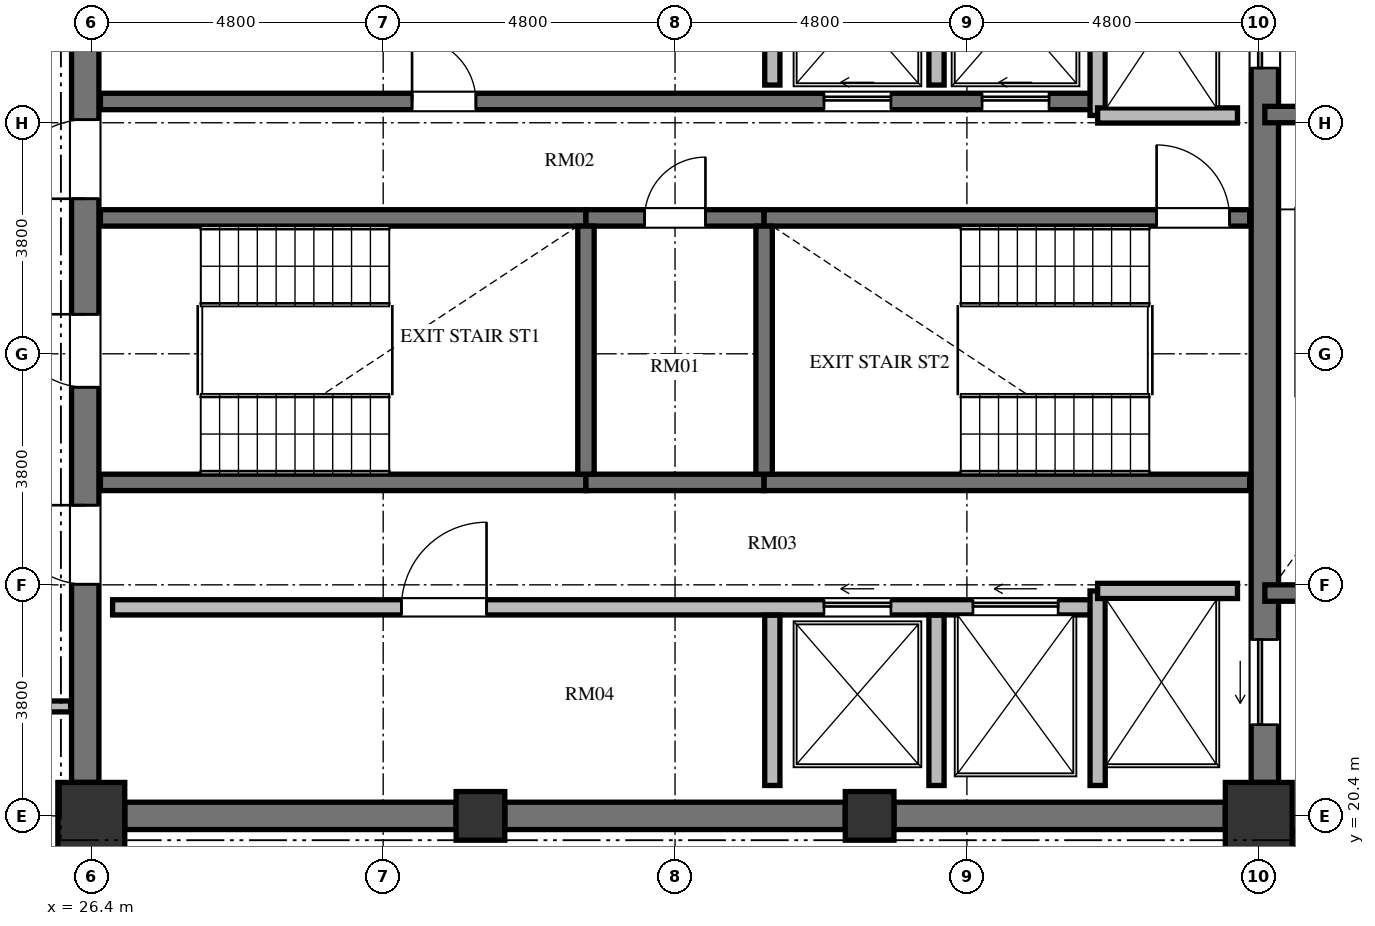
"""IFC4 building model, lengths in metres.
Left out: names, types, materials, properties, quantities, classifications, styles, units other than length and angle.
Written with IfcOpenShell. Run it as: python <this file> out.ifc"""

import sys

from ifc_helpers import new_model, si_unit, direction, frame, frame_2d, origin, origin_2d, place, context, subcontext, project, spatial, rectangle, extrude, element, fill, save


model = new_model("IFC4")
c1 = context("Model", 3, precision=1e-05, world=origin(), true_north=direction((0.0, 1.0)))
c2 = subcontext(c1, "Body", "Model", "MODEL_VIEW")
j1 = project(units=[si_unit("LENGTHUNIT", "METRE"), si_unit("PLANEANGLEUNIT", "RADIAN")], contexts=[c1])
p1 = place(None, origin())
s1 = spatial("IfcSite", under=j1, at=p1, CompositionType="ELEMENT")
p2 = place(p1, origin())
s2 = spatial("IfcBuilding", under=s1, at=p2, CompositionType="ELEMENT")
p3 = place(p2, frame((0.0, 0.0, 269.616)))
s3 = spatial("IfcBuildingStorey", under=s2, at=p3, CompositionType="ELEMENT", Elevation=269.616)
p4 = place(p3, frame((26.4, 20.4, 0.0), z_axis=(0.0, 0.0, 1.0), x_axis=(1.0, 0.0, 0.0)))
e1 = element("IfcColumn", 1, at=p4, inside=s3, PredefinedType="COLUMN", context=c2, shape_type="SweptSolid", body=[
    extrude(rectangle(XDim=1.1, YDim=1.1, at=origin_2d()), origin(), (0.0, 0.0, 1.0), 3.648),
])
for number, where, z_axis, x_axis in (
    (2, (32.8, 20.4, 0.0), (0.0, 0.0, 1.0), (1.0, 0.0, 0.0)),
    (3, (39.2, 20.4, 0.0), (0.0, 0.0, 1.0), (1.0, 0.0, 0.0)),
):
    element("IfcColumn", number, at=place(p3, frame(where, z_axis=z_axis, x_axis=x_axis)), inside=s3, PredefinedType="COLUMN", context=c2, shape_type="SweptSolid", body=[
        extrude(rectangle(XDim=0.8, YDim=0.8, at=origin_2d()), origin(), (0.0, 0.0, 1.0), 3.648),
    ])
p5 = place(p3, frame((45.6, 20.4, 0.0), z_axis=(0.0, 0.0, 1.0), x_axis=(1.0, 0.0, 0.0)))
e4 = element("IfcColumn", 4, at=p5, inside=s3, PredefinedType="COLUMN", context=c2, shape_type="SweptSolid", body=[
    extrude(rectangle(XDim=1.1, YDim=1.1, at=origin_2d()), origin(), (0.0, 0.0, 1.0), 3.648),
])
p6 = place(p3, frame((26.3, 20.95, 0.0), z_axis=(0.0, 0.0, 1.0), x_axis=(0.0, 1.0, 0.0)))
e5 = element("IfcWall", 5, at=p6, inside=s3, PredefinedType="SHEAR", context=c2, shape_type="SweptSolid", body=[
    extrude(rectangle(XDim=14.1, YDim=0.45, at=frame_2d((7.05, 0.0))), origin(), (0.0, 0.0, 1.0), 3.648),
])
p7 = place(p6, frame((6.5, 0.0, 0.0)))
e6 = element("IfcOpeningElement", 6, at=p7, cuts=e5, PredefinedType="OPENING", context=c2, shape_type="SweptSolid", body=[
    extrude(rectangle(XDim=1.2, YDim=2.15, at=frame_2d((0.6, 1.075))), frame((0.0, 0.235, 0.0), z_axis=(0.0, -1.0, 0.0), x_axis=(1.0, 0.0, 0.0)), (0.0, 0.0, 1.0), 0.47),
])
p8 = place(p6, frame((9.6, 0.0, 0.0)))
e7 = element("IfcOpeningElement", 7, at=p8, cuts=e5, PredefinedType="OPENING", context=c2, shape_type="SweptSolid", body=[
    extrude(rectangle(XDim=1.3, YDim=2.2, at=frame_2d((0.65, 1.1))), frame((0.0, 0.235, 0.0), z_axis=(0.0, -1.0, 0.0), x_axis=(1.0, 0.0, 0.0)), (0.0, 0.0, 1.0), 0.47),
])
p9 = place(p6, frame((3.26, 0.0, 0.0)))
e8 = element("IfcOpeningElement", 8, at=p9, cuts=e5, PredefinedType="OPENING", context=c2, shape_type="SweptSolid", body=[
    extrude(rectangle(XDim=1.3, YDim=2.2, at=frame_2d((0.65, 1.1))), frame((0.0, 0.235, 0.0), z_axis=(0.0, -1.0, 0.0), x_axis=(1.0, 0.0, 0.0)), (0.0, 0.0, 1.0), 0.47),
])
p10 = place(p3, frame((45.7, 20.95, 0.0), z_axis=(0.0, 0.0, 1.0), x_axis=(0.0, 1.0, 0.0)))
e9 = element("IfcWall", 9, at=p10, inside=s3, PredefinedType="SHEAR", context=c2, shape_type="SweptSolid", body=[
    extrude(rectangle(XDim=14.1, YDim=0.45, at=frame_2d((7.05, 0.0))), origin(), (0.0, 0.0, 1.0), 3.648),
])
p11 = place(p10, frame((11.75, 0.0, 0.0)))
e10 = element("IfcOpeningElement", 10, at=p11, cuts=e9, PredefinedType="OPENING", context=c2, shape_type="SweptSolid", body=[
    extrude(rectangle(XDim=1.4, YDim=2.3, at=frame_2d((0.7, 1.15))), frame((0.0, 0.235, 0.0), z_axis=(0.0, -1.0, 0.0), x_axis=(1.0, 0.0, 0.0)), (0.0, 0.0, 1.0), 0.47),
])
p12 = place(p10, frame((0.95, 0.0, 0.0)))
e11 = element("IfcOpeningElement", 11, at=p12, cuts=e9, PredefinedType="OPENING", context=c2, shape_type="SweptSolid", body=[
    extrude(rectangle(XDim=1.4, YDim=2.3, at=frame_2d((0.7, 1.15))), frame((0.0, 0.235, 0.0), z_axis=(0.0, -1.0, 0.0), x_axis=(1.0, 0.0, 0.0)), (0.0, 0.0, 1.0), 0.47),
])
p13 = place(p3, frame((26.95, 20.4, 0.0), z_axis=(0.0, 0.0, 1.0), x_axis=(1.0, 0.0, 0.0)))
e12 = element("IfcWall", 12, at=p13, inside=s3, PredefinedType="SHEAR", context=c2, shape_type="SweptSolid", body=[
    extrude(rectangle(XDim=5.45, YDim=0.45, at=frame_2d((2.725, 0.0))), origin(), (0.0, 0.0, 1.0), 3.648),
])
p14 = place(p3, frame((33.2, 20.4, 0.0), z_axis=(0.0, 0.0, 1.0), x_axis=(1.0, 0.0, 0.0)))
e13 = element("IfcWall", 13, at=p14, inside=s3, PredefinedType="SHEAR", context=c2, shape_type="SweptSolid", body=[
    extrude(rectangle(XDim=5.6, YDim=0.45, at=frame_2d((2.8, 0.0))), origin(), (0.0, 0.0, 1.0), 3.648),
])
p15 = place(p3, frame((39.6, 20.4, 0.0), z_axis=(0.0, 0.0, 1.0), x_axis=(1.0, 0.0, 0.0)))
e14 = element("IfcWall", 14, at=p15, inside=s3, PredefinedType="SHEAR", context=c2, shape_type="SweptSolid", body=[
    extrude(rectangle(XDim=5.45, YDim=0.45, at=frame_2d((2.725, 0.0))), origin(), (0.0, 0.0, 1.0), 3.648),
])
p16 = place(p3, frame((26.55, 30.235, 0.0), z_axis=(0.0, 0.0, 1.0), x_axis=(1.0, 0.0, 0.0)))
e15 = element("IfcWall", 15, at=p16, inside=s3, PredefinedType="SHEAR", context=c2, shape_type="SweptSolid", body=[
    extrude(rectangle(XDim=7.985, YDim=0.27, at=frame_2d((3.992, 0.0))), origin(), (0.0, 0.0, 1.0), 3.648),
])
p17 = place(p3, frame((34.535, 30.235, 0.0), z_axis=(0.0, 0.0, 1.0), x_axis=(1.0, 0.0, 0.0)))
e16 = element("IfcWall", 16, at=p17, inside=s3, PredefinedType="SHEAR", context=c2, shape_type="SweptSolid", body=[
    extrude(rectangle(XDim=2.93, YDim=0.27, at=frame_2d((1.465, 0.0))), origin(), (0.0, 0.0, 1.0), 3.648),
])
p18 = place(p17, frame((0.965, 0.0, 0.0)))
e17 = element("IfcOpeningElement", 17, at=p18, cuts=e16, PredefinedType="OPENING", context=c2, shape_type="SweptSolid", body=[
    extrude(rectangle(XDim=1.0, YDim=2.1, at=frame_2d((0.5, 1.05))), frame((0.0, 0.145, 0.0), z_axis=(0.0, -1.0, 0.0), x_axis=(1.0, 0.0, 0.0)), (0.0, 0.0, 1.0), 0.29),
])
p19 = place(p3, frame((37.465, 30.235, 0.0), z_axis=(0.0, 0.0, 1.0), x_axis=(1.0, 0.0, 0.0)))
e18 = element("IfcWall", 18, at=p19, inside=s3, PredefinedType="SHEAR", context=c2, shape_type="SweptSolid", body=[
    extrude(rectangle(XDim=7.985, YDim=0.27, at=frame_2d((3.992, 0.0))), origin(), (0.0, 0.0, 1.0), 3.648),
])
p20 = place(p19, frame((6.455, 0.0, 0.0)))
e19 = element("IfcOpeningElement", 19, at=p20, cuts=e18, PredefinedType="OPENING", context=c2, shape_type="SweptSolid", body=[
    extrude(rectangle(XDim=1.2, YDim=2.15, at=frame_2d((0.6, 1.075))), frame((0.0, 0.145, 0.0), z_axis=(0.0, -1.0, 0.0), x_axis=(1.0, 0.0, 0.0)), (0.0, 0.0, 1.0), 0.29),
])
p21 = place(p3, frame((26.55, 25.885, 0.0), z_axis=(0.0, 0.0, 1.0), x_axis=(1.0, 0.0, 0.0)))
e20 = element("IfcWall", 20, at=p21, inside=s3, PredefinedType="SHEAR", context=c2, shape_type="SweptSolid", body=[
    extrude(rectangle(XDim=7.985, YDim=0.27, at=frame_2d((3.992, 0.0))), origin(), (0.0, 0.0, 1.0), 3.648),
])
p22 = place(p3, frame((34.535, 25.885, 0.0), z_axis=(0.0, 0.0, 1.0), x_axis=(1.0, 0.0, 0.0)))
e21 = element("IfcWall", 21, at=p22, inside=s3, PredefinedType="SHEAR", context=c2, shape_type="SweptSolid", body=[
    extrude(rectangle(XDim=2.93, YDim=0.27, at=frame_2d((1.465, 0.0))), origin(), (0.0, 0.0, 1.0), 3.648),
])
p23 = place(p3, frame((37.465, 25.885, 0.0), z_axis=(0.0, 0.0, 1.0), x_axis=(1.0, 0.0, 0.0)))
e22 = element("IfcWall", 22, at=p23, inside=s3, PredefinedType="SHEAR", context=c2, shape_type="SweptSolid", body=[
    extrude(rectangle(XDim=7.985, YDim=0.27, at=frame_2d((3.992, 0.0))), origin(), (0.0, 0.0, 1.0), 3.648),
])
for number, where, z_axis, x_axis in (
    (23, (34.535, 26.02, 0.0), (0.0, 0.0, 1.0), (0.0, 1.0, 0.0)),
    (24, (37.465, 26.02, 0.0), (0.0, 0.0, 1.0), (0.0, 1.0, 0.0)),
):
    element("IfcWall", number, at=place(p3, frame(where, z_axis=z_axis, x_axis=x_axis)), inside=s3, PredefinedType="SHEAR", context=c2, shape_type="SweptSolid", body=[
        extrude(rectangle(XDim=4.08, YDim=0.27, at=frame_2d((2.04, 0.0))), origin(), (0.0, 0.0, 1.0), 3.648),
    ])
p24 = place(p3, frame((26.55, 32.15, 0.0), z_axis=(0.0, 0.0, 1.0), x_axis=(1.0, 0.0, 0.0)))
e25 = element("IfcWall", 25, at=p24, inside=s3, PredefinedType="SHEAR", context=c2, shape_type="SweptSolid", body=[
    extrude(rectangle(XDim=16.4, YDim=0.27, at=frame_2d((8.2, 0.0))), origin(), (0.0, 0.0, 1.0), 3.648),
])
p25 = place(p24, frame((5.125, 0.0, 0.0)))
e26 = element("IfcOpeningElement", 26, at=p25, cuts=e25, PredefinedType="OPENING", context=c2, shape_type="SweptSolid", body=[
    extrude(rectangle(XDim=1.05, YDim=2.15, at=frame_2d((0.525, 1.075))), frame((0.0, 0.145, 0.0), z_axis=(0.0, -1.0, 0.0), x_axis=(1.0, 0.0, 0.0)), (0.0, 0.0, 1.0), 0.29),
])
p26 = place(p24, frame((11.9, 0.0, 0.0)))
e27 = element("IfcOpeningElement", 27, at=p26, cuts=e25, PredefinedType="OPENING", context=c2, shape_type="SweptSolid", body=[
    extrude(rectangle(XDim=1.1, YDim=2.2, at=frame_2d((0.55, 1.1))), frame((0.0, 0.145, 0.0), z_axis=(0.0, -1.0, 0.0), x_axis=(1.0, 0.0, 0.0)), (0.0, 0.0, 1.0), 0.29),
])
p27 = place(p24, frame((14.5, 0.0, 0.0)))
e28 = element("IfcOpeningElement", 28, at=p27, cuts=e25, PredefinedType="OPENING", context=c2, shape_type="SweptSolid", body=[
    extrude(rectangle(XDim=1.1, YDim=2.2, at=frame_2d((0.55, 1.1))), frame((0.0, 0.145, 0.0), z_axis=(0.0, -1.0, 0.0), x_axis=(1.0, 0.0, 0.0)), (0.0, 0.0, 1.0), 0.29),
])
p28 = place(p3, frame((26.75, 23.83, 0.0), z_axis=(0.0, 0.0, 1.0), x_axis=(1.0, 0.0, 0.0)))
e29 = element("IfcWall", 29, at=p28, inside=s3, PredefinedType="SOLIDWALL", context=c2, shape_type="SweptSolid", body=[
    extrude(rectangle(XDim=16.2, YDim=0.25, at=frame_2d((8.1, 0.0))), origin(), (0.0, 0.0, 1.0), 3.448),
])
p29 = place(p28, frame((4.75, 0.0, 0.0)))
e30 = element("IfcOpeningElement", 30, at=p29, cuts=e29, PredefinedType="OPENING", context=c2, shape_type="SweptSolid", body=[
    extrude(rectangle(XDim=1.4, YDim=2.2, at=frame_2d((0.7, 1.1))), frame((0.0, 0.135, 0.0), z_axis=(0.0, -1.0, 0.0), x_axis=(1.0, 0.0, 0.0)), (0.0, 0.0, 1.0), 0.27),
])
p30 = place(p28, frame((11.7, 0.0, 0.0)))
e31 = element("IfcOpeningElement", 31, at=p30, cuts=e29, PredefinedType="OPENING", context=c2, shape_type="SweptSolid", body=[
    extrude(rectangle(XDim=1.1, YDim=2.2, at=frame_2d((0.55, 1.1))), frame((0.0, 0.135, 0.0), z_axis=(0.0, -1.0, 0.0), x_axis=(1.0, 0.0, 0.0)), (0.0, 0.0, 1.0), 0.27),
])
p31 = place(p28, frame((14.15, 0.0, 0.0)))
e32 = element("IfcOpeningElement", 32, at=p31, cuts=e29, PredefinedType="OPENING", context=c2, shape_type="SweptSolid", body=[
    extrude(rectangle(XDim=1.4, YDim=2.3, at=frame_2d((0.7, 1.15))), frame((0.0, 0.135, 0.0), z_axis=(0.0, -1.0, 0.0), x_axis=(1.0, 0.0, 0.0)), (0.0, 0.0, 1.0), 0.27),
])
p32 = place(p3, frame((42.95, 31.92, 0.0), z_axis=(0.0, 0.0, 1.0), x_axis=(0.0, 1.0, 0.0)))
e33 = element("IfcWall", 33, at=p32, inside=s3, PredefinedType="SOLIDWALL", context=c2, shape_type="SweptSolid", body=[
    extrude(rectangle(XDim=3.18, YDim=0.25, at=frame_2d((1.59, 0.0))), origin(), (0.0, 0.0, 1.0), 3.448),
])
p33 = place(p3, frame((42.95, 31.92, 0.0), z_axis=(0.0, 0.0, 1.0), x_axis=(1.0, 0.0, 0.0)))
e34 = element("IfcWall", 34, at=p33, inside=s3, PredefinedType="SOLIDWALL", context=c2, shape_type="SweptSolid", body=[
    extrude(rectangle(XDim=2.3, YDim=0.25, at=frame_2d((1.15, 0.0))), origin(), (0.0, 0.0, 1.0), 3.448),
])
p34 = place(p3, frame((42.95, 20.9, 0.0), z_axis=(0.0, 0.0, 1.0), x_axis=(0.0, 1.0, 0.0)))
e35 = element("IfcWall", 35, at=p34, inside=s3, PredefinedType="SOLIDWALL", context=c2, shape_type="SweptSolid", body=[
    extrude(rectangle(XDim=3.2, YDim=0.25, at=frame_2d((1.6, 0.0))), origin(), (0.0, 0.0, 1.0), 3.448),
])
p35 = place(p3, frame((42.95, 24.1, 0.0), z_axis=(0.0, 0.0, 1.0), x_axis=(1.0, 0.0, 0.0)))
e36 = element("IfcWall", 36, at=p35, inside=s3, PredefinedType="SOLIDWALL", context=c2, shape_type="SweptSolid", body=[
    extrude(rectangle(XDim=2.3, YDim=0.25, at=frame_2d((1.15, 0.0))), origin(), (0.0, 0.0, 1.0), 3.448),
])
p36 = place(p3, frame((37.6, 32.42, 0.0), z_axis=(0.0, 0.0, 1.0), x_axis=(0.0, 1.0, 0.0)))
e37 = element("IfcWall", 37, at=p36, inside=s3, PredefinedType="SOLIDWALL", context=c2, shape_type="SweptSolid", body=[
    extrude(rectangle(XDim=2.68, YDim=0.25, at=frame_2d((1.34, 0.0))), origin(), (0.0, 0.0, 1.0), 3.448),
])
p37 = place(p3, frame((37.6, 20.9, 0.0), z_axis=(0.0, 0.0, 1.0), x_axis=(0.0, 1.0, 0.0)))
e38 = element("IfcWall", 38, at=p37, inside=s3, PredefinedType="SOLIDWALL", context=c2, shape_type="SweptSolid", body=[
    extrude(rectangle(XDim=2.8, YDim=0.25, at=frame_2d((1.4, 0.0))), origin(), (0.0, 0.0, 1.0), 3.448),
])
p38 = place(p3, frame((40.3, 32.42, 0.0), z_axis=(0.0, 0.0, 1.0), x_axis=(0.0, 1.0, 0.0)))
e39 = element("IfcWall", 39, at=p38, inside=s3, PredefinedType="SOLIDWALL", context=c2, shape_type="SweptSolid", body=[
    extrude(rectangle(XDim=2.68, YDim=0.25, at=frame_2d((1.34, 0.0))), origin(), (0.0, 0.0, 1.0), 3.448),
])
p39 = place(p3, frame((40.3, 20.9, 0.0), z_axis=(0.0, 0.0, 1.0), x_axis=(0.0, 1.0, 0.0)))
e40 = element("IfcWall", 40, at=p39, inside=s3, PredefinedType="SOLIDWALL", context=c2, shape_type="SweptSolid", body=[
    extrude(rectangle(XDim=2.8, YDim=0.25, at=frame_2d((1.4, 0.0))), origin(), (0.0, 0.0, 1.0), 3.448),
])
for number, where, z_axis, x_axis in (
    (41, (45.7, 31.935, 0.0), (0.0, 0.0, 1.0), (1.0, 0.0, 0.0)),
    (42, (45.7, 24.065, 0.0), (0.0, 0.0, 1.0), (1.0, 0.0, 0.0)),
):
    element("IfcWall", number, at=place(p3, frame(where, z_axis=z_axis, x_axis=x_axis)), inside=s3, PredefinedType="SHEAR", context=c2, shape_type="SweptSolid", body=[
        extrude(rectangle(XDim=4.715, YDim=0.27, at=frame_2d((2.357, 0.0))), origin(), (0.0, 0.0, 1.0), 3.648),
    ])
p40 = place(p3, frame((45.7, 20.02, 0.0), z_axis=(0.0, 0.0, 1.0), x_axis=(1.0, 0.0, 0.0)))
e43 = element("IfcWall", 43, at=p40, inside=s3, PredefinedType="SOLIDWALL", context=c2, shape_type="SweptSolid", body=[
    extrude(rectangle(XDim=4.715, YDim=0.25, at=frame_2d((2.357, 0.0))), origin(), (0.0, 0.0, 1.0), 3.448),
])
p41 = place(p3, frame((26.06, 22.2, 0.0), z_axis=(0.0, 0.0, 1.0), x_axis=(-1.0, 0.0, 0.0)))
e44 = element("IfcWall", 44, at=p41, inside=s3, PredefinedType="PARTITIONING", context=c2, shape_type="SweptSolid", body=[
    extrude(rectangle(XDim=2.35, YDim=0.18, at=frame_2d((1.175, 0.0))), origin(), (0.0, 0.0, 1.0), 3.448),
])
p42 = place(p7, origin())
e45 = element("IfcDoor", 45, at=p42, inside=s3, OperationType="SINGLE_SWING_RIGHT", PredefinedType="DOOR", context=c2, shape_type="SweptSolid", body=[
    extrude(rectangle(XDim=1.2, YDim=2.15, at=frame_2d((0.6, 1.075))), frame((0.0, 0.025, 0.0), z_axis=(0.0, -1.0, 0.0), x_axis=(1.0, 0.0, 0.0)), (0.0, 0.0, 1.0), 0.05),
])
fill(e6, e45)
p43 = place(p20, origin())
e46 = element("IfcDoor", 46, at=p43, inside=s3, OperationType="SINGLE_SWING_LEFT", PredefinedType="DOOR", context=c2, shape_type="SweptSolid", body=[
    extrude(rectangle(XDim=1.2, YDim=2.15, at=frame_2d((0.6, 1.075))), frame((0.0, 0.025, 0.0), z_axis=(0.0, -1.0, 0.0), x_axis=(1.0, 0.0, 0.0)), (0.0, 0.0, 1.0), 0.05),
])
fill(e19, e46)
p44 = place(p18, origin())
e47 = element("IfcDoor", 47, at=p44, inside=s3, OperationType="SINGLE_SWING_RIGHT", PredefinedType="DOOR", context=c2, shape_type="SweptSolid", body=[
    extrude(rectangle(XDim=1.0, YDim=2.1, at=frame_2d((0.5, 1.05))), frame((0.0, 0.025, 0.0), z_axis=(0.0, -1.0, 0.0), x_axis=(1.0, 0.0, 0.0)), (0.0, 0.0, 1.0), 0.05),
])
fill(e17, e47)
p45 = place(p8, origin())
e48 = element("IfcDoor", 48, at=p45, inside=s3, OperationType="SINGLE_SWING_LEFT", PredefinedType="DOOR", context=c2, shape_type="SweptSolid", body=[
    extrude(rectangle(XDim=1.3, YDim=2.2, at=frame_2d((0.65, 1.1))), frame((0.0, 0.025, 0.0), z_axis=(0.0, -1.0, 0.0), x_axis=(1.0, 0.0, 0.0)), (0.0, 0.0, 1.0), 0.05),
])
fill(e7, e48)
p46 = place(p9, origin())
e49 = element("IfcDoor", 49, at=p46, inside=s3, OperationType="SINGLE_SWING_RIGHT", PredefinedType="DOOR", context=c2, shape_type="SweptSolid", body=[
    extrude(rectangle(XDim=1.3, YDim=2.2, at=frame_2d((0.65, 1.1))), frame((0.0, 0.025, 0.0), z_axis=(0.0, -1.0, 0.0), x_axis=(1.0, 0.0, 0.0)), (0.0, 0.0, 1.0), 0.05),
])
fill(e8, e49)
p47 = place(p25, origin())
e50 = element("IfcDoor", 50, at=p47, inside=s3, OperationType="SINGLE_SWING_LEFT", PredefinedType="DOOR", context=c2, shape_type="SweptSolid", body=[
    extrude(rectangle(XDim=1.05, YDim=2.15, at=frame_2d((0.525, 1.075))), frame((0.0, 0.025, 0.0), z_axis=(0.0, -1.0, 0.0), x_axis=(1.0, 0.0, 0.0)), (0.0, 0.0, 1.0), 0.05),
])
fill(e26, e50)
p48 = place(p29, origin())
e51 = element("IfcDoor", 51, at=p48, inside=s3, OperationType="SINGLE_SWING_RIGHT", PredefinedType="DOOR", context=c2, shape_type="SweptSolid", body=[
    extrude(rectangle(XDim=1.4, YDim=2.2, at=frame_2d((0.7, 1.1))), frame((0.0, 0.025, 0.0), z_axis=(0.0, -1.0, 0.0), x_axis=(1.0, 0.0, 0.0)), (0.0, 0.0, 1.0), 0.05),
])
fill(e30, e51)
p49 = place(p26, origin())
e52 = element("IfcDoor", 52, at=p49, inside=s3, OperationType="SLIDING_TO_LEFT", PredefinedType="DOOR", context=c2, shape_type="SweptSolid", body=[
    extrude(rectangle(XDim=1.1, YDim=2.2, at=frame_2d((0.55, 1.1))), frame((0.0, 0.025, 0.0), z_axis=(0.0, -1.0, 0.0), x_axis=(1.0, 0.0, 0.0)), (0.0, 0.0, 1.0), 0.05),
])
fill(e27, e52)
p50 = place(p27, origin())
e53 = element("IfcDoor", 53, at=p50, inside=s3, OperationType="SLIDING_TO_LEFT", PredefinedType="DOOR", context=c2, shape_type="SweptSolid", body=[
    extrude(rectangle(XDim=1.1, YDim=2.2, at=frame_2d((0.55, 1.1))), frame((0.0, 0.025, 0.0), z_axis=(0.0, -1.0, 0.0), x_axis=(1.0, 0.0, 0.0)), (0.0, 0.0, 1.0), 0.05),
])
fill(e28, e53)
p51 = place(p30, origin())
e54 = element("IfcDoor", 54, at=p51, inside=s3, OperationType="SLIDING_TO_LEFT", PredefinedType="DOOR", context=c2, shape_type="SweptSolid", body=[
    extrude(rectangle(XDim=1.1, YDim=2.2, at=frame_2d((0.55, 1.1))), frame((0.0, 0.025, 0.0), z_axis=(0.0, -1.0, 0.0), x_axis=(1.0, 0.0, 0.0)), (0.0, 0.0, 1.0), 0.05),
])
fill(e31, e54)
p52 = place(p11, origin())
e55 = element("IfcDoor", 55, at=p52, inside=s3, OperationType="SLIDING_TO_LEFT", PredefinedType="DOOR", context=c2, shape_type="SweptSolid", body=[
    extrude(rectangle(XDim=1.4, YDim=2.3, at=frame_2d((0.7, 1.15))), frame((0.0, 0.025, 0.0), z_axis=(0.0, -1.0, 0.0), x_axis=(1.0, 0.0, 0.0)), (0.0, 0.0, 1.0), 0.05),
])
fill(e10, e55)
p53 = place(p12, origin())
e56 = element("IfcDoor", 56, at=p53, inside=s3, OperationType="SLIDING_TO_LEFT", PredefinedType="DOOR", context=c2, shape_type="SweptSolid", body=[
    extrude(rectangle(XDim=1.4, YDim=2.3, at=frame_2d((0.7, 1.15))), frame((0.0, 0.025, 0.0), z_axis=(0.0, -1.0, 0.0), x_axis=(1.0, 0.0, 0.0)), (0.0, 0.0, 1.0), 0.05),
])
fill(e11, e56)
p54 = place(p31, origin())
e57 = element("IfcDoor", 57, at=p54, inside=s3, OperationType="SLIDING_TO_LEFT", PredefinedType="DOOR", context=c2, shape_type="SweptSolid", body=[
    extrude(rectangle(XDim=1.4, YDim=2.3, at=frame_2d((0.7, 1.15))), frame((0.0, 0.025, 0.0), z_axis=(0.0, -1.0, 0.0), x_axis=(1.0, 0.0, 0.0)), (0.0, 0.0, 1.0), 0.05),
])
fill(e32, e57)
save(model, sys.argv[1])
